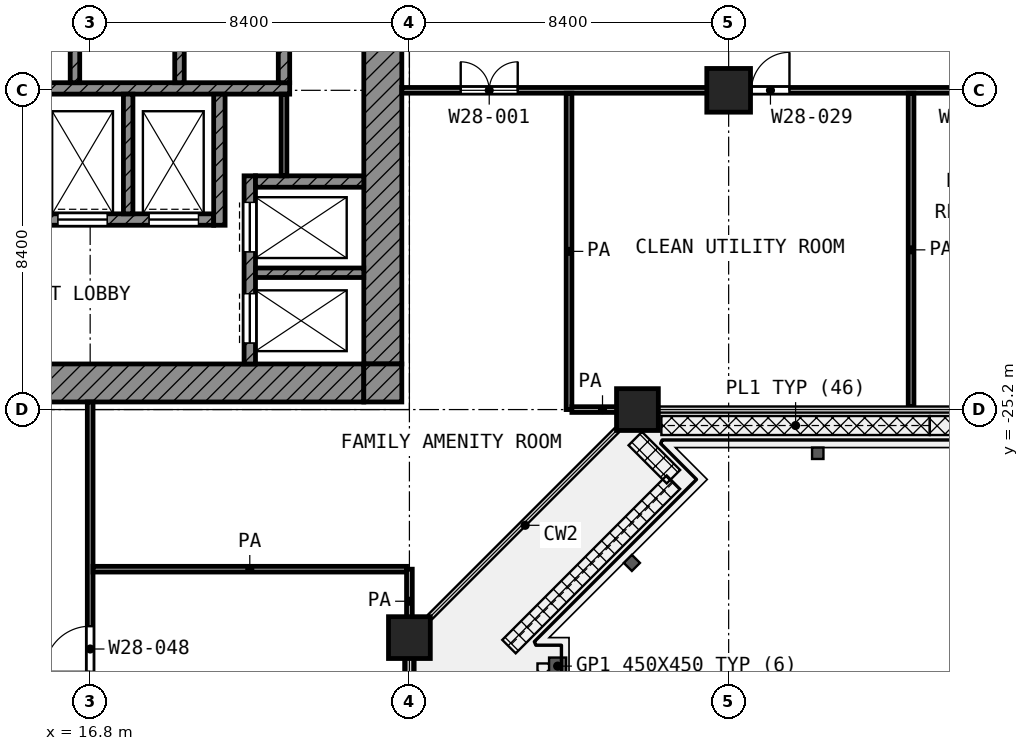
"""IFC4 building model, lengths in metres.
Left out: names, types, materials, properties, quantities, classifications, styles, units other than length and angle.
Written with IfcOpenShell. Run it as: python <this file> out.ifc"""

import sys

from ifc_helpers import new_model, si_unit, direction, frame, frame_2d, origin, origin_2d, place, context, subcontext, project, spatial, rectangle, extrude, element, fill, save


model = new_model("IFC4")
c1 = context("Model", 3, precision=1e-05, world=origin(), true_north=direction((0.0, 1.0)))
c2 = subcontext(c1, "Body", "Model", "MODEL_VIEW")
j1 = project(units=[si_unit("LENGTHUNIT", "METRE"), si_unit("PLANEANGLEUNIT", "RADIAN")], contexts=[c1])
p1 = place(None, origin())
s1 = spatial("IfcSite", under=j1, at=p1, CompositionType="ELEMENT")
p2 = place(p1, origin())
s2 = spatial("IfcBuilding", under=s1, at=p2, CompositionType="ELEMENT")
p3 = place(p2, frame((0.0, 0.0, 124.0)))
s3 = spatial("IfcBuildingStorey", under=s2, at=p3, CompositionType="ELEMENT", Elevation=124.0)
p4 = place(p3, frame((33.6, -16.8, 0.0), z_axis=(0.0, 0.0, 1.0), x_axis=(1.0, 0.0, 0.0)))
e1 = element("IfcColumn", 1, at=p4, inside=s3, PredefinedType="COLUMN", context=c2, shape_type="SweptSolid", body=[
    extrude(rectangle(XDim=1.15, YDim=1.15, at=origin_2d()), origin(), (0.0, 0.0, 1.0), 4.2),
])
for number, where, z_axis, x_axis in (
    (2, (31.2, -25.2, 0.0), (0.0, 0.0, 1.0), (1.0, 0.0, 0.0)),
    (3, (25.2, -31.2, 0.0), (0.0, 0.0, 1.0), (1.0, 0.0, 0.0)),
):
    element("IfcColumn", number, at=place(p3, frame(where, z_axis=z_axis, x_axis=x_axis)), inside=s3, PredefinedType="COLUMN", context=c2, shape_type="SweptSolid", body=[
        extrude(rectangle(XDim=1.1, YDim=1.1, at=origin_2d()), origin(), (0.0, 0.0, 1.0), 4.2),
    ])
p5 = place(p3, frame((25.2, -34.992, 0.0), z_axis=(0.0, 0.0, 1.0), x_axis=(0.0, 1.0, 0.0)))
e4 = element("IfcWall", 4, at=p5, inside=s3, PredefinedType="SOLIDWALL", context=c2, shape_type="SweptSolid", body=[
    extrude(rectangle(XDim=3.242, YDim=0.25, at=frame_2d((1.621, 0.0))), origin(), (0.0, 0.0, 1.0), 3.48),
])
p6 = place(p5, frame((1.621, 0.0, 0.0)))
e5 = element("IfcOpeningElement", 5, at=p6, cuts=e4, PredefinedType="OPENING", context=c2, shape_type="SweptSolid", body=[
    extrude(rectangle(XDim=1.0, YDim=2.1, at=frame_2d((0.5, 1.05))), frame((0.0, 0.135, 0.0), z_axis=(0.0, -1.0, 0.0), x_axis=(1.0, 0.0, 0.0)), (0.0, 0.0, 1.0), 0.27),
])
p7 = place(p3, frame((24.5, -24.0, 0.0), z_axis=(0.0, 0.0, 1.0), x_axis=(0.0, 1.0, 0.0)))
e6 = element("IfcWall", 6, at=p7, inside=s3, PredefinedType="SHEAR", context=c2, shape_type="SweptSolid", body=[
    extrude(rectangle(XDim=18.6, YDim=1.0, at=frame_2d((9.3, 0.0))), origin(), (0.0, 0.0, 1.0), 3.6),
])
p8 = place(p7, frame((10.5, 0.0, 0.0)))
e7 = element("IfcOpeningElement", 7, at=p8, cuts=e6, PredefinedType="OPENING", context=c2, shape_type="SweptSolid", body=[
    extrude(rectangle(XDim=1.8, YDim=2.1, at=frame_2d((0.9, 1.05))), frame((0.0, 0.51, 0.0), z_axis=(0.0, -1.0, 0.0), x_axis=(1.0, 0.0, 0.0)), (0.0, 0.0, 1.0), 1.02),
])
p9 = place(p3, frame((5.4, -24.5, 0.0), z_axis=(0.0, 0.0, 1.0), x_axis=(1.0, 0.0, 0.0)))
e8 = element("IfcWall", 8, at=p9, inside=s3, PredefinedType="SHEAR", context=c2, shape_type="SweptSolid", body=[
    extrude(rectangle(XDim=18.6, YDim=1.0, at=frame_2d((9.3, 0.0))), origin(), (0.0, 0.0, 1.0), 3.6),
])
p10 = place(p9, frame((6.3, 0.0, 0.0)))
e9 = element("IfcOpeningElement", 9, at=p10, cuts=e8, PredefinedType="OPENING", context=c2, shape_type="SweptSolid", body=[
    extrude(rectangle(XDim=1.8, YDim=2.1, at=frame_2d((0.9, 1.05))), frame((0.0, 0.51, 0.0), z_axis=(0.0, -1.0, 0.0), x_axis=(1.0, 0.0, 0.0)), (0.0, 0.0, 1.0), 1.02),
])
p11 = place(p3, frame((24.5, -25.0, 0.0), z_axis=(0.0, 0.0, 1.0), x_axis=(0.0, 1.0, 0.0)))
e10 = element("IfcWall", 10, at=p11, inside=s3, PredefinedType="SHEAR", context=c2, shape_type="SweptSolid", body=[
    extrude(rectangle(XDim=1.0, YDim=1.0, at=frame_2d((0.5, 0.0))), origin(), (0.0, 0.0, 1.0), 3.6),
])
p12 = place(p3, frame((5.4, -16.75, 0.0), z_axis=(0.0, 0.0, 1.0), x_axis=(1.0, 0.0, 0.0)))
e11 = element("IfcWall", 11, at=p12, inside=s3, PredefinedType="SHEAR", context=c2, shape_type="SweptSolid", body=[
    extrude(rectangle(XDim=16.65, YDim=0.3, at=frame_2d((8.325, 0.0))), origin(), (0.0, 0.0, 1.0), 3.6),
])
p13 = place(p3, frame((5.4, -20.2, 0.0), z_axis=(0.0, 0.0, 1.0), x_axis=(1.0, 0.0, 0.0)))
e12 = element("IfcWall", 12, at=p13, inside=s3, PredefinedType="SHEAR", context=c2, shape_type="SweptSolid", body=[
    extrude(rectangle(XDim=14.65, YDim=0.3, at=frame_2d((7.325, 0.0))), origin(), (0.0, 0.0, 1.0), 3.6),
])
p14 = place(p13, frame((10.55, 0.0, 0.0)))
e13 = element("IfcOpeningElement", 13, at=p14, cuts=e12, PredefinedType="OPENING", context=c2, shape_type="SweptSolid", body=[
    extrude(rectangle(XDim=1.3, YDim=2.1, at=frame_2d((0.65, 1.05))), frame((0.0, 0.16, 0.0), z_axis=(0.0, -1.0, 0.0), x_axis=(1.0, 0.0, 0.0)), (0.0, 0.0, 1.0), 0.32),
])
p15 = place(p13, frame((12.95, 0.0, 0.0)))
e14 = element("IfcOpeningElement", 14, at=p15, cuts=e12, PredefinedType="OPENING", context=c2, shape_type="SweptSolid", body=[
    extrude(rectangle(XDim=1.3, YDim=2.1, at=frame_2d((0.65, 1.05))), frame((0.0, 0.16, 0.0), z_axis=(0.0, -1.0, 0.0), x_axis=(1.0, 0.0, 0.0)), (0.0, 0.0, 1.0), 0.32),
])
p16 = place(p13, frame((0.55, 0.0, 0.0)))
e15 = element("IfcOpeningElement", 15, at=p16, cuts=e12, PredefinedType="OPENING", context=c2, shape_type="SweptSolid", body=[
    extrude(rectangle(XDim=1.3, YDim=2.1, at=frame_2d((0.65, 1.05))), frame((0.0, 0.16, 0.0), z_axis=(0.0, -1.0, 0.0), x_axis=(1.0, 0.0, 0.0)), (0.0, 0.0, 1.0), 0.32),
])
p17 = place(p13, frame((2.95, 0.0, 0.0)))
e16 = element("IfcOpeningElement", 16, at=p17, cuts=e12, PredefinedType="OPENING", context=c2, shape_type="SweptSolid", body=[
    extrude(rectangle(XDim=1.3, YDim=2.1, at=frame_2d((0.65, 1.05))), frame((0.0, 0.16, 0.0), z_axis=(0.0, -1.0, 0.0), x_axis=(1.0, 0.0, 0.0)), (0.0, 0.0, 1.0), 0.32),
])
p18 = place(p13, frame((7.15, 0.0, 0.0)))
e17 = element("IfcOpeningElement", 17, at=p18, cuts=e12, PredefinedType="OPENING", context=c2, shape_type="SweptSolid", body=[
    extrude(rectangle(XDim=0.9, YDim=2.1, at=frame_2d((0.45, 1.05))), frame((0.0, 0.16, 0.0), z_axis=(0.0, -1.0, 0.0), x_axis=(1.0, 0.0, 0.0)), (0.0, 0.0, 1.0), 0.32),
])
p19 = place(p3, frame((20.2, -20.35, 0.0), z_axis=(0.0, 0.0, 1.0), x_axis=(0.0, 1.0, 0.0)))
e18 = element("IfcWall", 18, at=p19, inside=s3, PredefinedType="SHEAR", context=c2, shape_type="SweptSolid", body=[
    extrude(rectangle(XDim=3.45, YDim=0.3, at=frame_2d((1.725, 0.0))), origin(), (0.0, 0.0, 1.0), 3.6),
])
p20 = place(p3, frame((21.9, -16.6, 0.0), z_axis=(0.0, 0.0, 1.0), x_axis=(0.0, 1.0, 0.0)))
e19 = element("IfcWall", 19, at=p20, inside=s3, PredefinedType="SHEAR", context=c2, shape_type="SweptSolid", body=[
    extrude(rectangle(XDim=2.35, YDim=0.3, at=frame_2d((1.175, 0.0))), origin(), (0.0, 0.0, 1.0), 3.6),
])
p21 = place(p3, frame((21.15, -19.2, 0.0), z_axis=(0.0, 0.0, 1.0), x_axis=(1.0, 0.0, 0.0)))
e20 = element("IfcWall", 20, at=p21, inside=s3, PredefinedType="SHEAR", context=c2, shape_type="SweptSolid", body=[
    extrude(rectangle(XDim=2.85, YDim=0.3, at=frame_2d((1.425, 0.0))), origin(), (0.0, 0.0, 1.0), 3.6),
])
p22 = place(p3, frame((21.0, -24.0, 0.0), z_axis=(0.0, 0.0, 1.0), x_axis=(0.0, 1.0, 0.0)))
e21 = element("IfcWall", 21, at=p22, inside=s3, PredefinedType="SHEAR", context=c2, shape_type="SweptSolid", body=[
    extrude(rectangle(XDim=4.95, YDim=0.3, at=frame_2d((2.475, 0.0))), origin(), (0.0, 0.0, 1.0), 3.6),
])
p23 = place(p22, frame((2.95, 0.0, 0.0)))
e22 = element("IfcOpeningElement", 22, at=p23, cuts=e21, PredefinedType="OPENING", context=c2, shape_type="SweptSolid", body=[
    extrude(rectangle(XDim=1.3, YDim=2.1, at=frame_2d((0.65, 1.05))), frame((0.0, 0.16, 0.0), z_axis=(0.0, -1.0, 0.0), x_axis=(1.0, 0.0, 0.0)), (0.0, 0.0, 1.0), 0.32),
])
p24 = place(p22, frame((0.55, 0.0, 0.0)))
e23 = element("IfcOpeningElement", 23, at=p24, cuts=e21, PredefinedType="OPENING", context=c2, shape_type="SweptSolid", body=[
    extrude(rectangle(XDim=1.3, YDim=2.1, at=frame_2d((0.65, 1.05))), frame((0.0, 0.16, 0.0), z_axis=(0.0, -1.0, 0.0), x_axis=(1.0, 0.0, 0.0)), (0.0, 0.0, 1.0), 0.32),
])
p25 = place(p3, frame((21.15, -21.6, 0.0), z_axis=(0.0, 0.0, 1.0), x_axis=(1.0, 0.0, 0.0)))
e24 = element("IfcWall", 24, at=p25, inside=s3, PredefinedType="SHEAR", context=c2, shape_type="SweptSolid", body=[
    extrude(rectangle(XDim=2.85, YDim=0.25, at=frame_2d((1.425, 0.0))), origin(), (0.0, 0.0, 1.0), 3.6),
])
p26 = place(p3, frame((17.8, -20.05, 0.0), z_axis=(0.0, 0.0, 1.0), x_axis=(0.0, 1.0, 0.0)))
e25 = element("IfcWall", 25, at=p26, inside=s3, PredefinedType="SHEAR", context=c2, shape_type="SweptSolid", body=[
    extrude(rectangle(XDim=3.15, YDim=0.25, at=frame_2d((1.575, 0.0))), origin(), (0.0, 0.0, 1.0), 3.6),
])
for number, where, z_axis, x_axis in (
    (26, (16.4, -16.6, 0.0), (0.0, 0.0, 1.0), (0.0, 1.0, 0.0)),
    (27, (19.15, -16.6, 0.0), (0.0, 0.0, 1.0), (0.0, 1.0, 0.0)),
):
    element("IfcWall", number, at=place(p3, frame(where, z_axis=z_axis, x_axis=x_axis)), inside=s3, PredefinedType="SHEAR", context=c2, shape_type="SweptSolid", body=[
        extrude(rectangle(XDim=2.35, YDim=0.25, at=frame_2d((1.175, 0.0))), origin(), (0.0, 0.0, 1.0), 3.6),
    ])
p27 = place(p3, frame((21.9, -19.05, 0.0), z_axis=(0.0, 0.0, 1.0), x_axis=(0.0, 1.0, 0.0)))
e28 = element("IfcWall", 28, at=p27, inside=s3, PredefinedType="PARTITIONING", context=c2, shape_type="SweptSolid", body=[
    extrude(rectangle(XDim=2.15, YDim=0.15, at=frame_2d((1.075, 0.0))), origin(), (0.0, 0.0, 1.0), 3.6),
])
p28 = place(p3, frame((16.875, -29.4, 0.0), z_axis=(0.0, 0.0, 1.0), x_axis=(1.0, 0.0, 0.0)))
e29 = element("IfcWall", 29, at=p28, inside=s3, PredefinedType="PARTITIONING", context=c2, shape_type="SweptSolid", body=[
    extrude(rectangle(XDim=8.25, YDim=0.15, at=frame_2d((4.125, 0.0))), origin(), (0.0, 0.0, 1.0), 3.6),
])
p29 = place(p3, frame((29.475, -25.2, 0.0), z_axis=(0.0, 0.0, 1.0), x_axis=(1.0, 0.0, 0.0)))
e30 = element("IfcWall", 30, at=p29, inside=s3, PredefinedType="PARTITIONING", context=c2, shape_type="SweptSolid", body=[
    extrude(rectangle(XDim=1.612, YDim=0.15, at=frame_2d((0.806, 0.0))), origin(), (0.0, 0.0, 1.0), 3.6),
])
p30 = place(p3, frame((25.0, -16.8, 0.0), z_axis=(0.0, 0.0, 1.0), x_axis=(1.0, 0.0, 0.0)))
e31 = element("IfcWall", 31, at=p30, inside=s3, PredefinedType="PARTITIONING", context=c2, shape_type="SweptSolid", body=[
    extrude(rectangle(XDim=41.625, YDim=0.15, at=frame_2d((20.812, 0.0))), origin(), (0.0, 0.0, 1.0), 3.6),
])
p31 = place(p30, frame((1.55, 0.0, 0.0)))
e32 = element("IfcOpeningElement", 32, at=p31, cuts=e31, PredefinedType="OPENING", context=c2, shape_type="SweptSolid", body=[
    extrude(rectangle(XDim=1.5, YDim=2.1, at=frame_2d((0.75, 1.05))), frame((0.0, 0.085, 0.0), z_axis=(0.0, -1.0, 0.0), x_axis=(1.0, 0.0, 0.0)), (0.0, 0.0, 1.0), 0.17),
])
p32 = place(p30, frame((9.2, 0.0, 0.0)))
e33 = element("IfcOpeningElement", 33, at=p32, cuts=e31, PredefinedType="OPENING", context=c2, shape_type="SweptSolid", body=[
    extrude(rectangle(XDim=1.0, YDim=2.1, at=frame_2d((0.5, 1.05))), frame((0.0, 0.085, 0.0), z_axis=(0.0, -1.0, 0.0), x_axis=(1.0, 0.0, 0.0)), (0.0, 0.0, 1.0), 0.17),
])
p33 = place(p30, frame((14.6, 0.0, 0.0)))
e34 = element("IfcOpeningElement", 34, at=p33, cuts=e31, PredefinedType="OPENING", context=c2, shape_type="SweptSolid", body=[
    extrude(rectangle(XDim=1.2, YDim=2.1, at=frame_2d((0.6, 1.05))), frame((0.0, 0.085, 0.0), z_axis=(0.0, -1.0, 0.0), x_axis=(1.0, 0.0, 0.0)), (0.0, 0.0, 1.0), 0.17),
])
p34 = place(p30, frame((17.7, 0.0, 0.0)))
e35 = element("IfcOpeningElement", 35, at=p34, cuts=e31, PredefinedType="OPENING", context=c2, shape_type="SweptSolid", body=[
    extrude(rectangle(XDim=0.9, YDim=2.1, at=frame_2d((0.45, 1.05))), frame((0.0, 0.085, 0.0), z_axis=(0.0, -1.0, 0.0), x_axis=(1.0, 0.0, 0.0)), (0.0, 0.0, 1.0), 0.17),
])
p35 = place(p30, frame((23.6, 0.0, 0.0)))
e36 = element("IfcOpeningElement", 36, at=p35, cuts=e31, PredefinedType="OPENING", context=c2, shape_type="SweptSolid", body=[
    extrude(rectangle(XDim=1.2, YDim=2.1, at=frame_2d((0.6, 1.05))), frame((0.0, 0.085, 0.0), z_axis=(0.0, -1.0, 0.0), x_axis=(1.0, 0.0, 0.0)), (0.0, 0.0, 1.0), 0.17),
])
p36 = place(p30, frame((26.4, 0.0, 0.0)))
e37 = element("IfcOpeningElement", 37, at=p36, cuts=e31, PredefinedType="OPENING", context=c2, shape_type="SweptSolid", body=[
    extrude(rectangle(XDim=1.2, YDim=2.1, at=frame_2d((0.6, 1.05))), frame((0.0, 0.085, 0.0), z_axis=(0.0, -1.0, 0.0), x_axis=(1.0, 0.0, 0.0)), (0.0, 0.0, 1.0), 0.17),
])
p37 = place(p30, frame((35.0, 0.0, 0.0)))
e38 = element("IfcOpeningElement", 38, at=p37, cuts=e31, PredefinedType="OPENING", context=c2, shape_type="SweptSolid", body=[
    extrude(rectangle(XDim=1.2, YDim=2.1, at=frame_2d((0.6, 1.05))), frame((0.0, 0.085, 0.0), z_axis=(0.0, -1.0, 0.0), x_axis=(1.0, 0.0, 0.0)), (0.0, 0.0, 1.0), 0.17),
])
p38 = place(p30, frame((32.25, 0.0, 0.0)))
e39 = element("IfcOpeningElement", 39, at=p38, cuts=e31, PredefinedType="OPENING", context=c2, shape_type="SweptSolid", body=[
    extrude(rectangle(XDim=0.9, YDim=2.1, at=frame_2d((0.45, 1.05))), frame((0.0, 0.085, 0.0), z_axis=(0.0, -1.0, 0.0), x_axis=(1.0, 0.0, 0.0)), (0.0, 0.0, 1.0), 0.17),
])
p39 = place(p30, frame((39.062, 0.0, 0.0)))
e40 = element("IfcOpeningElement", 40, at=p39, cuts=e31, PredefinedType="OPENING", context=c2, shape_type="SweptSolid", body=[
    extrude(rectangle(XDim=0.9, YDim=2.1, at=frame_2d((0.45, 1.05))), frame((0.0, 0.085, 0.0), z_axis=(0.0, -1.0, 0.0), x_axis=(1.0, 0.0, 0.0)), (0.0, 0.0, 1.0), 0.17),
])
p40 = place(p3, frame((16.8, -58.72, 0.0), z_axis=(0.0, 0.0, 1.0), x_axis=(0.0, 1.0, 0.0)))
e41 = element("IfcWall", 41, at=p40, inside=s3, PredefinedType="PARTITIONING", context=c2, shape_type="SweptSolid", body=[
    extrude(rectangle(XDim=33.72, YDim=0.15, at=frame_2d((16.86, 0.0))), origin(), (0.0, 0.0, 1.0), 2.7),
])
p41 = place(p40, frame((26.62, 0.0, 0.0)))
e42 = element("IfcOpeningElement", 42, at=p41, cuts=e41, PredefinedType="OPENING", context=c2, shape_type="SweptSolid", body=[
    extrude(rectangle(XDim=1.2, YDim=2.1, at=frame_2d((0.6, 1.05))), frame((0.0, 0.085, 0.0), z_axis=(0.0, -1.0, 0.0), x_axis=(1.0, 0.0, 0.0)), (0.0, 0.0, 1.0), 0.17),
])
p42 = place(p40, frame((22.12, 0.0, 0.0)))
e43 = element("IfcOpeningElement", 43, at=p42, cuts=e41, PredefinedType="OPENING", context=c2, shape_type="SweptSolid", body=[
    extrude(rectangle(XDim=1.2, YDim=2.1, at=frame_2d((0.6, 1.05))), frame((0.0, 0.085, 0.0), z_axis=(0.0, -1.0, 0.0), x_axis=(1.0, 0.0, 0.0)), (0.0, 0.0, 1.0), 0.17),
])
p43 = place(p40, frame((17.92, 0.0, 0.0)))
e44 = element("IfcOpeningElement", 44, at=p43, cuts=e41, PredefinedType="OPENING", context=c2, shape_type="SweptSolid", body=[
    extrude(rectangle(XDim=1.2, YDim=2.1, at=frame_2d((0.6, 1.05))), frame((0.0, 0.085, 0.0), z_axis=(0.0, -1.0, 0.0), x_axis=(1.0, 0.0, 0.0)), (0.0, 0.0, 1.0), 0.17),
])
p44 = place(p40, frame((15.17, 0.0, 0.0)))
e45 = element("IfcOpeningElement", 45, at=p44, cuts=e41, PredefinedType="OPENING", context=c2, shape_type="SweptSolid", body=[
    extrude(rectangle(XDim=0.9, YDim=2.1, at=frame_2d((0.45, 1.05))), frame((0.0, 0.085, 0.0), z_axis=(0.0, -1.0, 0.0), x_axis=(1.0, 0.0, 0.0)), (0.0, 0.0, 1.0), 0.17),
])
p45 = place(p40, frame((9.32, 0.0, 0.0)))
e46 = element("IfcOpeningElement", 46, at=p45, cuts=e41, PredefinedType="OPENING", context=c2, shape_type="SweptSolid", body=[
    extrude(rectangle(XDim=1.2, YDim=2.1, at=frame_2d((0.6, 1.05))), frame((0.0, 0.085, 0.0), z_axis=(0.0, -1.0, 0.0), x_axis=(1.0, 0.0, 0.0)), (0.0, 0.0, 1.0), 0.17),
])
p46 = place(p40, frame((6.52, 0.0, 0.0)))
e47 = element("IfcOpeningElement", 47, at=p46, cuts=e41, PredefinedType="OPENING", context=c2, shape_type="SweptSolid", body=[
    extrude(rectangle(XDim=1.2, YDim=2.1, at=frame_2d((0.6, 1.05))), frame((0.0, 0.085, 0.0), z_axis=(0.0, -1.0, 0.0), x_axis=(1.0, 0.0, 0.0)), (0.0, 0.0, 1.0), 0.17),
])
p47 = place(p40, frame((1.37, 0.0, 0.0)))
e48 = element("IfcOpeningElement", 48, at=p47, cuts=e41, PredefinedType="OPENING", context=c2, shape_type="SweptSolid", body=[
    extrude(rectangle(XDim=1.0, YDim=2.1, at=frame_2d((0.5, 1.05))), frame((0.0, 0.085, 0.0), z_axis=(0.0, -1.0, 0.0), x_axis=(1.0, 0.0, 0.0)), (0.0, 0.0, 1.0), 0.17),
])
p48 = place(p3, frame((25.2, -31.087, 0.0), z_axis=(0.0, 0.0, 1.0), x_axis=(0.0, 1.0, 0.0)))
e49 = element("IfcWall", 49, at=p48, inside=s3, PredefinedType="PARTITIONING", context=c2, shape_type="SweptSolid", body=[
    extrude(rectangle(XDim=1.687, YDim=0.15, at=frame_2d((0.844, 0.0))), origin(), (0.0, 0.0, 1.0), 3.6),
])
p49 = place(p3, frame((29.4, -25.2, 0.0), z_axis=(0.0, 0.0, 1.0), x_axis=(0.0, 1.0, 0.0)))
e50 = element("IfcWall", 50, at=p49, inside=s3, PredefinedType="PARTITIONING", context=c2, shape_type="SweptSolid", body=[
    extrude(rectangle(XDim=8.325, YDim=0.15, at=frame_2d((4.163, 0.0))), origin(), (0.0, 0.0, 1.0), 3.6),
])
p50 = place(p3, frame((38.4, -25.12, 0.0), z_axis=(0.0, 0.0, 1.0), x_axis=(0.0, 1.0, 0.0)))
e51 = element("IfcWall", 51, at=p50, inside=s3, PredefinedType="PARTITIONING", context=c2, shape_type="SweptSolid", body=[
    extrude(rectangle(XDim=8.245, YDim=0.15, at=frame_2d((4.123, 0.0))), origin(), (0.0, 0.0, 1.0), 2.7),
])
p51 = place(p23, origin())
e52 = element("IfcDoor", 52, at=p51, inside=s3, OperationType="DOUBLE_DOOR_SLIDING", PredefinedType="DOOR", context=c2, shape_type="SweptSolid", body=[
    extrude(rectangle(XDim=1.3, YDim=2.1, at=frame_2d((0.65, 1.05))), frame((0.0, 0.025, 0.0), z_axis=(0.0, -1.0, 0.0), x_axis=(1.0, 0.0, 0.0)), (0.0, 0.0, 1.0), 0.05),
])
fill(e22, e52)
p52 = place(p24, origin())
e53 = element("IfcDoor", 53, at=p52, inside=s3, OperationType="DOUBLE_DOOR_SLIDING", PredefinedType="DOOR", context=c2, shape_type="SweptSolid", body=[
    extrude(rectangle(XDim=1.3, YDim=2.1, at=frame_2d((0.65, 1.05))), frame((0.0, 0.025, 0.0), z_axis=(0.0, -1.0, 0.0), x_axis=(1.0, 0.0, 0.0)), (0.0, 0.0, 1.0), 0.05),
])
fill(e23, e53)
p53 = place(p14, origin())
e54 = element("IfcDoor", 54, at=p53, inside=s3, OperationType="DOUBLE_DOOR_SLIDING", PredefinedType="DOOR", context=c2, shape_type="SweptSolid", body=[
    extrude(rectangle(XDim=1.3, YDim=2.1, at=frame_2d((0.65, 1.05))), frame((0.0, 0.025, 0.0), z_axis=(0.0, -1.0, 0.0), x_axis=(1.0, 0.0, 0.0)), (0.0, 0.0, 1.0), 0.05),
])
fill(e13, e54)
p54 = place(p15, origin())
e55 = element("IfcDoor", 55, at=p54, inside=s3, OperationType="DOUBLE_DOOR_SLIDING", PredefinedType="DOOR", context=c2, shape_type="SweptSolid", body=[
    extrude(rectangle(XDim=1.3, YDim=2.1, at=frame_2d((0.65, 1.05))), frame((0.0, 0.025, 0.0), z_axis=(0.0, -1.0, 0.0), x_axis=(1.0, 0.0, 0.0)), (0.0, 0.0, 1.0), 0.05),
])
fill(e14, e55)
p55 = place(p31, origin())
e56 = element("IfcDoor", 56, at=p55, inside=s3, OperationType="DOUBLE_DOOR_SINGLE_SWING", PredefinedType="DOOR", context=c2, shape_type="SweptSolid", body=[
    extrude(rectangle(XDim=1.5, YDim=2.1, at=frame_2d((0.75, 1.05))), frame((0.0, 0.025, 0.0), z_axis=(0.0, -1.0, 0.0), x_axis=(1.0, 0.0, 0.0)), (0.0, 0.0, 1.0), 0.05),
])
fill(e32, e56)
p56 = place(p32, origin())
e57 = element("IfcDoor", 57, at=p56, inside=s3, OperationType="SINGLE_SWING_RIGHT", PredefinedType="DOOR", context=c2, shape_type="SweptSolid", body=[
    extrude(rectangle(XDim=1.0, YDim=2.1, at=frame_2d((0.5, 1.05))), frame((0.0, 0.025, 0.0), z_axis=(0.0, -1.0, 0.0), x_axis=(1.0, 0.0, 0.0)), (0.0, 0.0, 1.0), 0.05),
])
fill(e33, e57)
p57 = place(p41, origin())
e58 = element("IfcDoor", 58, at=p57, inside=s3, OperationType="SINGLE_SWING_LEFT", PredefinedType="DOOR", context=c2, shape_type="SweptSolid", body=[
    extrude(rectangle(XDim=1.2, YDim=2.1, at=frame_2d((0.6, 1.05))), frame((0.0, 0.025, 0.0), z_axis=(0.0, -1.0, 0.0), x_axis=(1.0, 0.0, 0.0)), (0.0, 0.0, 1.0), 0.05),
])
fill(e42, e58)
save(model, sys.argv[1])
